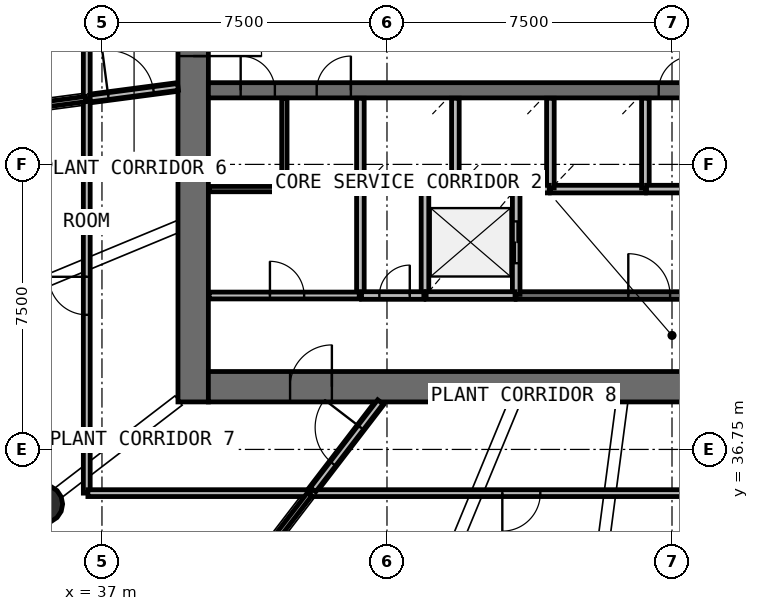
"""IFC4 building model, lengths in metres.
Left out: names, types, materials, properties, quantities, classifications, styles, units other than length and angle.
Written with IfcOpenShell. Run it as: python <this file> out.ifc"""

import sys

from ifc_helpers import new_model, si_unit, direction, frame, frame_2d, origin, origin_2d, place, context, subcontext, project, spatial, rectangle, circle, extrude, source, transform, mapped, element, fill, save


model = new_model("IFC4")
c1 = context("Model", 3, precision=1e-05, world=origin(), true_north=direction((0.0, 1.0)))
c2 = subcontext(c1, "Body", "Model", "MODEL_VIEW")
j1 = project(units=[si_unit("LENGTHUNIT", "METRE"), si_unit("PLANEANGLEUNIT", "RADIAN")], contexts=[c1])
p1 = place(None, origin())
s1 = spatial("IfcSite", under=j1, at=p1, CompositionType="ELEMENT")
p2 = place(p1, origin())
s2 = spatial("IfcBuilding", under=s1, at=p2, CompositionType="ELEMENT")
p3 = place(p2, frame((0.0, 0.0, 129.0)))
s3 = spatial("IfcBuildingStorey", under=s2, at=p3, CompositionType="ELEMENT", Elevation=129.0)
p4 = place(p3, frame((39.4, 58.0, 0.0), z_axis=(0.0, 0.0, 1.0), x_axis=(0.0, -1.0, 0.0)))
e1 = element("IfcWall", 1, at=p4, inside=s3, PredefinedType="SHEAR", context=c2, shape_type="SweptSolid", body=[
    extrude(rectangle(XDim=20.0, YDim=0.8, at=frame_2d((10.0, 0.0))), origin(), (0.0, 0.0, 1.0), 4.1),
])
p5 = place(p4, frame((9.1, 0.0, 0.0)))
e2 = element("IfcOpeningElement", 2, at=p5, cuts=e1, PredefinedType="OPENING", context=c2, shape_type="SweptSolid", body=[
    extrude(rectangle(XDim=1.8, YDim=2.1, at=frame_2d((0.9, 1.05))), frame((0.0, 0.41, 0.0), z_axis=(0.0, -1.0, 0.0), x_axis=(1.0, 0.0, 0.0)), (0.0, 0.0, 1.0), 0.82),
])
p6 = place(p3, frame((39.8, 38.4, 0.0), z_axis=(0.0, 0.0, 1.0), x_axis=(1.0, 0.0, 0.0)))
e3 = element("IfcWall", 3, at=p6, inside=s3, PredefinedType="SHEAR", context=c2, shape_type="SweptSolid", body=[
    extrude(rectangle(XDim=24.4, YDim=0.8, at=frame_2d((12.2, 0.0))), origin(), (0.0, 0.0, 1.0), 4.1),
])
p7 = place(p6, frame((21.65, 0.0, 0.0)))
e4 = element("IfcOpeningElement", 4, at=p7, cuts=e3, PredefinedType="OPENING", context=c2, shape_type="SweptSolid", body=[
    extrude(rectangle(XDim=1.1, YDim=2.1, at=frame_2d((0.55, 1.05))), frame((0.0, 0.41, 0.0), z_axis=(0.0, -1.0, 0.0), x_axis=(1.0, 0.0, 0.0)), (0.0, 0.0, 1.0), 0.82),
])
p8 = place(p6, frame((2.15, 0.0, 0.0)))
e5 = element("IfcOpeningElement", 5, at=p8, cuts=e3, PredefinedType="OPENING", context=c2, shape_type="SweptSolid", body=[
    extrude(rectangle(XDim=1.1, YDim=2.1, at=frame_2d((0.55, 1.05))), frame((0.0, 0.41, 0.0), z_axis=(0.0, -1.0, 0.0), x_axis=(1.0, 0.0, 0.0)), (0.0, 0.0, 1.0), 0.82),
])
p9 = place(p3, frame((39.8, 46.2, 0.0), z_axis=(0.0, 0.0, 1.0), x_axis=(1.0, 0.0, 0.0)))
e6 = element("IfcWall", 6, at=p9, inside=s3, PredefinedType="SHEAR", context=c2, shape_type="SweptSolid", body=[
    extrude(rectangle(XDim=24.4, YDim=0.4, at=frame_2d((12.2, 0.0))), origin(), (0.0, 0.0, 1.0), 4.1),
])
p10 = place(p9, frame((20.65, 0.0, 0.0)))
e7 = element("IfcOpeningElement", 7, at=p10, cuts=e6, PredefinedType="OPENING", context=c2, shape_type="SweptSolid", body=[
    extrude(rectangle(XDim=0.9, YDim=2.1, at=frame_2d((0.45, 1.05))), frame((0.0, 0.21, 0.0), z_axis=(0.0, -1.0, 0.0), x_axis=(1.0, 0.0, 0.0)), (0.0, 0.0, 1.0), 0.42),
])
p11 = place(p9, frame((22.65, 0.0, 0.0)))
e8 = element("IfcOpeningElement", 8, at=p11, cuts=e6, PredefinedType="OPENING", context=c2, shape_type="SweptSolid", body=[
    extrude(rectangle(XDim=0.9, YDim=2.1, at=frame_2d((0.45, 1.05))), frame((0.0, 0.21, 0.0), z_axis=(0.0, -1.0, 0.0), x_axis=(1.0, 0.0, 0.0)), (0.0, 0.0, 1.0), 0.42),
])
p12 = place(p9, frame((0.85, 0.0, 0.0)))
e9 = element("IfcOpeningElement", 9, at=p12, cuts=e6, PredefinedType="OPENING", context=c2, shape_type="SweptSolid", body=[
    extrude(rectangle(XDim=0.9, YDim=2.1, at=frame_2d((0.45, 1.05))), frame((0.0, 0.21, 0.0), z_axis=(0.0, -1.0, 0.0), x_axis=(1.0, 0.0, 0.0)), (0.0, 0.0, 1.0), 0.42),
])
p13 = place(p9, frame((2.85, 0.0, 0.0)))
e10 = element("IfcOpeningElement", 10, at=p13, cuts=e6, PredefinedType="OPENING", context=c2, shape_type="SweptSolid", body=[
    extrude(rectangle(XDim=0.9, YDim=2.1, at=frame_2d((0.45, 1.05))), frame((0.0, 0.21, 0.0), z_axis=(0.0, -1.0, 0.0), x_axis=(1.0, 0.0, 0.0)), (0.0, 0.0, 1.0), 0.42),
])
p14 = place(p9, frame((11.85, 0.0, 0.0)))
e11 = element("IfcOpeningElement", 11, at=p14, cuts=e6, PredefinedType="OPENING", context=c2, shape_type="SweptSolid", body=[
    extrude(rectangle(XDim=0.9, YDim=2.1, at=frame_2d((0.45, 1.05))), frame((0.0, 0.21, 0.0), z_axis=(0.0, -1.0, 0.0), x_axis=(1.0, 0.0, 0.0)), (0.0, 0.0, 1.0), 0.42),
])
m1 = source(origin(), c2, "Body", "SweptSolid", [
    extrude(circle(Radius=0.5, at=origin_2d()), origin(), (0.0, 0.0, 1.0), 3.78),
])
p15 = place(p3, frame((35.465, 35.312, 0.0), z_axis=(0.0, 0.0, 1.0), x_axis=(1.0, 0.0, 0.0)))
e12 = element("IfcColumn", 12, at=p15, inside=s3, PredefinedType="COLUMN", context=c2, shape_type="MappedRepresentation", body=[
    mapped(m1, transform((0.0, 0.0, 0.0), scale=1.0)),
])
p16 = place(p3, frame((47.9, 40.8, 0.0), z_axis=(0.0, 0.0, 1.0), x_axis=(1.0, 0.0, 0.0)))
e13 = element("IfcWall", 13, at=p16, inside=s3, PredefinedType="SOLIDWALL", context=c2, shape_type="SweptSolid", body=[
    extrude(rectangle(XDim=5.67, YDim=0.2, at=frame_2d((2.835, 0.0))), origin(), (0.0, 0.0, 1.0), 3.78),
])
p17 = place(p16, frame((2.95, 0.0, 0.0)))
e14 = element("IfcOpeningElement", 14, at=p17, cuts=e13, PredefinedType="OPENING", context=c2, shape_type="SweptSolid", body=[
    extrude(rectangle(XDim=1.1, YDim=2.1, at=frame_2d((0.55, 1.05))), frame((0.0, 0.11, 0.0), z_axis=(0.0, -1.0, 0.0), x_axis=(1.0, 0.0, 0.0)), (0.0, 0.0, 1.0), 0.22),
])
for number, where, z_axis, x_axis in (
    (15, (43.8, 43.6, 0.0), (0.0, 0.0, 1.0), (0.0, -1.0, 0.0)),
    (16, (45.5, 43.6, 0.0), (0.0, 0.0, 1.0), (0.0, -1.0, 0.0)),
):
    element("IfcWall", number, at=place(p3, frame(where, z_axis=z_axis, x_axis=x_axis)), inside=s3, PredefinedType="SOLIDWALL", context=c2, shape_type="SweptSolid", body=[
        extrude(rectangle(XDim=2.8, YDim=0.2, at=frame_2d((1.4, 0.0))), origin(), (0.0, 0.0, 1.0), 3.78),
    ])
p18 = place(p3, frame((47.9, 40.83, 0.0), z_axis=(0.0, 0.0, 1.0), x_axis=(0.0, 1.0, 0.0)))
e17 = element("IfcWall", 17, at=p18, inside=s3, PredefinedType="SOLIDWALL", context=c2, shape_type="SweptSolid", body=[
    extrude(rectangle(XDim=2.77, YDim=0.2, at=frame_2d((1.385, 0.0))), origin(), (0.0, 0.0, 1.0), 3.78),
])
p19 = place(p18, frame((0.82, 0.0, 0.0)))
e18 = element("IfcOpeningElement", 18, at=p19, cuts=e17, PredefinedType="OPENING", context=c2, shape_type="SweptSolid", body=[
    extrude(rectangle(XDim=1.1, YDim=2.1, at=frame_2d((0.55, 1.05))), frame((0.0, 0.11, 0.0), z_axis=(0.0, -1.0, 0.0), x_axis=(1.0, 0.0, 0.0)), (0.0, 0.0, 1.0), 0.22),
])
p20 = place(p3, frame((48.8, 43.6, 0.0), z_axis=(0.0, 0.0, 1.0), x_axis=(1.0, 0.0, 0.0)))
e19 = element("IfcWall", 19, at=p20, inside=s3, PredefinedType="SOLIDWALL", context=c2, shape_type="SweptSolid", body=[
    extrude(rectangle(XDim=2.5, YDim=0.2, at=frame_2d((1.25, 0.0))), origin(), (0.0, 0.0, 1.0), 3.78),
])
p21 = place(p3, frame((45.53, 40.8, 0.0), z_axis=(0.0, 0.0, 1.0), x_axis=(1.0, 0.0, 0.0)))
e20 = element("IfcWall", 20, at=p21, inside=s3, PredefinedType="SOLIDWALL", context=c2, shape_type="SweptSolid", body=[
    extrude(rectangle(XDim=2.34, YDim=0.2, at=frame_2d((1.17, 0.0))), origin(), (0.0, 0.0, 1.0), 3.78),
])
p22 = place(p3, frame((43.8, 45.99, 0.0), z_axis=(0.0, 0.0, 1.0), x_axis=(0.0, -1.0, 0.0)))
e21 = element("IfcWall", 21, at=p22, inside=s3, PredefinedType="SOLIDWALL", context=c2, shape_type="SweptSolid", body=[
    extrude(rectangle(XDim=2.36, YDim=0.2, at=frame_2d((1.18, 0.0))), origin(), (0.0, 0.0, 1.0), 3.78),
])
p23 = place(p3, frame((46.3, 43.6, 0.0), z_axis=(0.0, 0.0, 1.0), x_axis=(0.0, 1.0, 0.0)))
e22 = element("IfcWall", 22, at=p23, inside=s3, PredefinedType="SOLIDWALL", context=c2, shape_type="SweptSolid", body=[
    extrude(rectangle(XDim=2.39, YDim=0.2, at=frame_2d((1.195, 0.0))), origin(), (0.0, 0.0, 1.0), 3.78),
])
for number, where, z_axis, x_axis in (
    (23, (48.8, 43.63, 0.0), (0.0, 0.0, 1.0), (0.0, 1.0, 0.0)),
    (24, (51.3, 43.63, 0.0), (0.0, 0.0, 1.0), (0.0, 1.0, 0.0)),
):
    element("IfcWall", number, at=place(p3, frame(where, z_axis=z_axis, x_axis=x_axis)), inside=s3, PredefinedType="SOLIDWALL", context=c2, shape_type="SweptSolid", body=[
        extrude(rectangle(XDim=2.36, YDim=0.2, at=frame_2d((1.18, 0.0))), origin(), (0.0, 0.0, 1.0), 3.78),
    ])
p24 = place(p3, frame((43.83, 43.6, 0.0), z_axis=(0.0, 0.0, 1.0), x_axis=(1.0, 0.0, 0.0)))
e25 = element("IfcWall", 25, at=p24, inside=s3, PredefinedType="SOLIDWALL", context=c2, shape_type="SweptSolid", body=[
    extrude(rectangle(XDim=1.64, YDim=0.2, at=frame_2d((0.82, 0.0))), origin(), (0.0, 0.0, 1.0), 3.78),
])
p25 = place(p3, frame((43.83, 40.8, 0.0), z_axis=(0.0, 0.0, 1.0), x_axis=(1.0, 0.0, 0.0)))
e26 = element("IfcWall", 26, at=p25, inside=s3, PredefinedType="SOLIDWALL", context=c2, shape_type="SweptSolid", body=[
    extrude(rectangle(XDim=1.64, YDim=0.2, at=frame_2d((0.82, 0.0))), origin(), (0.0, 0.0, 1.0), 3.78),
])
p26 = place(p25, frame((0.47, 0.0, 0.0)))
e27 = element("IfcOpeningElement", 27, at=p26, cuts=e26, PredefinedType="OPENING", context=c2, shape_type="SweptSolid", body=[
    extrude(rectangle(XDim=0.8, YDim=2.1, at=frame_2d((0.4, 1.05))), frame((0.0, 0.11, 0.0), z_axis=(0.0, -1.0, 0.0), x_axis=(1.0, 0.0, 0.0)), (0.0, 0.0, 1.0), 0.22),
])
p27 = place(p3, frame((46.33, 43.6, 0.0), z_axis=(0.0, 0.0, 1.0), x_axis=(1.0, 0.0, 0.0)))
e28 = element("IfcWall", 28, at=p27, inside=s3, PredefinedType="SOLIDWALL", context=c2, shape_type="SweptSolid", body=[
    extrude(rectangle(XDim=1.54, YDim=0.2, at=frame_2d((0.77, 0.0))), origin(), (0.0, 0.0, 1.0), 3.78),
])
p28 = place(p3, frame((52.67, 43.6, 0.0), z_axis=(0.0, 0.0, 1.0), x_axis=(-1.0, 0.0, 0.0)))
e29 = element("IfcWall", 29, at=p28, inside=s3, PredefinedType="SOLIDWALL", context=c2, shape_type="SweptSolid", body=[
    extrude(rectangle(XDim=1.34, YDim=0.2, at=frame_2d((0.67, 0.0))), origin(), (0.0, 0.0, 1.0), 3.78),
])
p29 = place(p3, frame((47.93, 43.6, 0.0), z_axis=(0.0, 0.0, 1.0), x_axis=(1.0, 0.0, 0.0)))
e30 = element("IfcWall", 30, at=p29, inside=s3, PredefinedType="SOLIDWALL", context=c2, shape_type="SweptSolid", body=[
    extrude(rectangle(XDim=0.84, YDim=0.2, at=frame_2d((0.42, 0.0))), origin(), (0.0, 0.0, 1.0), 3.78),
])
p30 = place(p3, frame((45.53, 43.6, 0.0), z_axis=(0.0, 0.0, 1.0), x_axis=(1.0, 0.0, 0.0)))
e31 = element("IfcWall", 31, at=p30, inside=s3, PredefinedType="SOLIDWALL", context=c2, shape_type="SweptSolid", body=[
    extrude(rectangle(XDim=0.74, YDim=0.2, at=frame_2d((0.37, 0.0))), origin(), (0.0, 0.0, 1.0), 3.78),
])
p31 = place(p3, frame((36.6, 45.973, 0.0), z_axis=(0.0, 0.0, 1.0), x_axis=(0.0, 1.0, 0.0)))
e32 = element("IfcWall", 32, at=p31, inside=s3, PredefinedType="PARTITIONING", context=c2, shape_type="SweptSolid", body=[
    extrude(rectangle(XDim=13.24, YDim=0.18, at=frame_2d((6.62, 0.0))), origin(), (0.0, 0.0, 1.0), 2.58),
])
p32 = place(p31, frame((6.19, 0.0, 0.0)))
e33 = element("IfcOpeningElement", 33, at=p32, cuts=e32, PredefinedType="OPENING", context=c2, shape_type="SweptSolid", body=[
    extrude(rectangle(XDim=1.0, YDim=2.1, at=frame_2d((0.5, 1.05))), frame((0.0, 0.1, 0.0), z_axis=(0.0, -1.0, 0.0), x_axis=(1.0, 0.0, 0.0)), (0.0, 0.0, 1.0), 0.2),
])
p33 = place(p3, frame((53.603, 35.6, 0.0), z_axis=(0.0, 0.0, 1.0), x_axis=(-1.0, 0.0, 0.0)))
e34 = element("IfcWall", 34, at=p33, inside=s3, PredefinedType="PARTITIONING", context=c2, shape_type="SweptSolid", body=[
    extrude(rectangle(XDim=11.117, YDim=0.18, at=frame_2d((5.559, 0.0))), origin(), (0.0, 0.0, 1.0), 2.58),
])
p34 = place(p33, frame((5.067, 0.0, 0.0)))
e35 = element("IfcOpeningElement", 35, at=p34, cuts=e34, PredefinedType="OPENING", context=c2, shape_type="SweptSolid", body=[
    extrude(rectangle(XDim=1.0, YDim=2.1, at=frame_2d((0.5, 1.05))), frame((0.0, 0.1, 0.0), z_axis=(0.0, -1.0, 0.0), x_axis=(1.0, 0.0, 0.0)), (0.0, 0.0, 1.0), 0.2),
])
p35 = place(p3, frame((36.6, 35.6, 0.0), z_axis=(0.0, 0.0, 1.0), x_axis=(0.0, 1.0, 0.0)))
e36 = element("IfcWall", 36, at=p35, inside=s3, PredefinedType="PARTITIONING", context=c2, shape_type="SweptSolid", body=[
    extrude(rectangle(XDim=10.343, YDim=0.18, at=frame_2d((5.171, 0.0))), origin(), (0.0, 0.0, 1.0), 2.58),
])
p36 = place(p35, frame((4.693, 0.0, 0.0)))
e37 = element("IfcOpeningElement", 37, at=p36, cuts=e36, PredefinedType="OPENING", context=c2, shape_type="SweptSolid", body=[
    extrude(rectangle(XDim=1.0, YDim=2.1, at=frame_2d((0.5, 1.05))), frame((0.0, 0.1, 0.0), z_axis=(0.0, -1.0, 0.0), x_axis=(1.0, 0.0, 0.0)), (0.0, 0.0, 1.0), 0.2),
])
p37 = place(p3, frame((36.63, 35.6, 0.0), z_axis=(0.0, 0.0, 1.0), x_axis=(1.0, 0.0, 0.0)))
e38 = element("IfcWall", 38, at=p37, inside=s3, PredefinedType="PARTITIONING", context=c2, shape_type="SweptSolid", body=[
    extrude(rectangle(XDim=5.825, YDim=0.18, at=frame_2d((2.913, 0.0))), origin(), (0.0, 0.0, 1.0), 2.58),
])
p38 = place(p3, frame((39.82, 40.8, 0.0), z_axis=(0.0, 0.0, 1.0), x_axis=(1.0, 0.0, 0.0)))
e39 = element("IfcWall", 39, at=p38, inside=s3, PredefinedType="PARTITIONING", context=c2, shape_type="SweptSolid", body=[
    extrude(rectangle(XDim=3.95, YDim=0.18, at=frame_2d((1.975, 0.0))), origin(), (0.0, 0.0, 1.0), 3.78),
])
p39 = place(p38, frame((1.6, 0.0, 0.0)))
e40 = element("IfcOpeningElement", 40, at=p39, cuts=e39, PredefinedType="OPENING", context=c2, shape_type="SweptSolid", body=[
    extrude(rectangle(XDim=0.9, YDim=2.1, at=frame_2d((0.45, 1.05))), frame((0.0, 0.1, 0.0), z_axis=(0.0, -1.0, 0.0), x_axis=(1.0, 0.0, 0.0)), (0.0, 0.0, 1.0), 0.2),
])
p40 = place(p3, frame((42.554, 35.69, 0.0), z_axis=(0.0, 0.0, 1.0), x_axis=(0.608737787706, 0.793371480341, 0.0)))
e41 = element("IfcWall", 41, at=p40, inside=s3, PredefinedType="PARTITIONING", context=c2, shape_type="SweptSolid", body=[
    extrude(rectangle(XDim=2.912, YDim=0.18, at=frame_2d((1.456, 0.0))), origin(), (0.0, 0.0, 1.0), 2.58),
])
p41 = place(p40, frame((0.862, 0.0, 0.0)))
e42 = element("IfcOpeningElement", 42, at=p41, cuts=e41, PredefinedType="OPENING", context=c2, shape_type="SweptSolid", body=[
    extrude(rectangle(XDim=1.2, YDim=2.1, at=frame_2d((0.6, 1.05))), frame((0.0, 0.1, 0.0), z_axis=(0.0, -1.0, 0.0), x_axis=(1.0, 0.0, 0.0)), (0.0, 0.0, 1.0), 0.2),
])
p42 = place(p3, frame((36.69, 45.984, 0.0), z_axis=(0.0, 0.0, 1.0), x_axis=(0.991440737811, 0.130557509967, 0.0)))
e43 = element("IfcWall", 43, at=p42, inside=s3, PredefinedType="PARTITIONING", context=c2, shape_type="SweptSolid", body=[
    extrude(rectangle(XDim=2.33, YDim=0.18, at=frame_2d((1.165, 0.0))), origin(), (0.0, 0.0, 1.0), 2.58),
])
p43 = place(p42, frame((0.48, 0.0, 0.0)))
e44 = element("IfcOpeningElement", 44, at=p43, cuts=e43, PredefinedType="OPENING", context=c2, shape_type="SweptSolid", body=[
    extrude(rectangle(XDim=1.2, YDim=2.1, at=frame_2d((0.6, 1.05))), frame((0.0, 0.1, 0.0), z_axis=(0.0, -1.0, 0.0), x_axis=(1.0, 0.0, 0.0)), (0.0, 0.0, 1.0), 0.2),
])
p44 = place(p3, frame((36.57, 45.969, 0.0), z_axis=(0.0, 0.0, 1.0), x_axis=(-0.991447734454, -0.130504367157, 0.0)))
e45 = element("IfcWall", 45, at=p44, inside=s3, PredefinedType="PARTITIONING", context=c2, shape_type="SweptSolid", body=[
    extrude(rectangle(XDim=3.547, YDim=0.14, at=frame_2d((1.773, 0.0))), origin(), (0.0, 0.0, 1.0), 2.58),
])
p45 = place(p3, frame((41.8, 43.6, 0.0), z_axis=(0.0, 0.0, 1.0), x_axis=(0.0, 1.0, 0.0)))
e46 = element("IfcWall", 46, at=p45, inside=s3, PredefinedType="PARTITIONING", context=c2, shape_type="SweptSolid", body=[
    extrude(rectangle(XDim=2.39, YDim=0.14, at=frame_2d((1.195, 0.0))), origin(), (0.0, 0.0, 1.0), 2.98),
])
p46 = place(p3, frame((42.463, 35.571, 0.0), z_axis=(0.0, 0.0, 1.0), x_axis=(-0.608788650818, -0.79333245152, 0.0)))
e47 = element("IfcWall", 47, at=p46, inside=s3, PredefinedType="PARTITIONING", context=c2, shape_type="SweptSolid", body=[
    extrude(rectangle(XDim=2.253, YDim=0.14, at=frame_2d((1.126, 0.0))), origin(), (0.0, 0.0, 1.0), 2.58),
])
p47 = place(p3, frame((43.77, 43.6, 0.0), z_axis=(0.0, 0.0, 1.0), x_axis=(-1.0, 0.0, 0.0)))
e48 = element("IfcWall", 48, at=p47, inside=s3, PredefinedType="PARTITIONING", context=c2, shape_type="SweptSolid", body=[
    extrude(rectangle(XDim=1.94, YDim=0.14, at=frame_2d((0.97, 0.0))), origin(), (0.0, 0.0, 1.0), 2.98),
])
p48 = place(p3, frame((41.77, 43.6, 0.0), z_axis=(0.0, 0.0, 1.0), x_axis=(-1.0, 0.0, 0.0)))
e49 = element("IfcWall", 49, at=p48, inside=s3, PredefinedType="PARTITIONING", context=c2, shape_type="SweptSolid", body=[
    extrude(rectangle(XDim=1.95, YDim=0.14, at=frame_2d((0.975, 0.0))), origin(), (0.0, 0.0, 1.0), 2.98),
])
m2 = source(origin(), c2, "Body", "SweptSolid", [
    extrude(rectangle(XDim=1.8, YDim=2.1, at=frame_2d((0.9, 1.05))), frame((0.0, 0.025, 0.0), z_axis=(0.0, -1.0, 0.0), x_axis=(1.0, 0.0, 0.0)), (0.0, 0.0, 1.0), 0.05),
])
p49 = place(p5, origin())
e50 = element("IfcDoor", 50, at=p49, inside=s3, OperationType="SINGLE_SWING_RIGHT", PredefinedType="DOOR", context=c2, shape_type="MappedRepresentation", body=[
    mapped(m2, transform((0.0, 0.0, 0.0), scale=1.0)),
])
fill(e2, e50)
m3 = source(origin(), c2, "Body", "SweptSolid", [
    extrude(rectangle(XDim=1.1, YDim=2.1, at=frame_2d((0.55, 1.05))), frame((0.0, 0.025, 0.0), z_axis=(0.0, -1.0, 0.0), x_axis=(1.0, 0.0, 0.0)), (0.0, 0.0, 1.0), 0.05),
])
p50 = place(p19, origin())
e51 = element("IfcDoor", 51, at=p50, inside=s3, OperationType="DOUBLE_DOOR_SLIDING", PredefinedType="USERDEFINED", context=c2, shape_type="MappedRepresentation", body=[
    mapped(m3, transform((0.0, 0.0, 0.0), scale=1.0)),
])
fill(e18, e51)
m4 = source(origin(), c2, "Body", "SweptSolid", [
    extrude(rectangle(XDim=1.1, YDim=2.1, at=frame_2d((0.55, 1.05))), frame((0.0, 0.025, 0.0), z_axis=(0.0, -1.0, 0.0), x_axis=(1.0, 0.0, 0.0)), (0.0, 0.0, 1.0), 0.05),
])
p51 = place(p17, origin())
e52 = element("IfcDoor", 52, at=p51, inside=s3, OperationType="SINGLE_SWING_LEFT", PredefinedType="DOOR", context=c2, shape_type="MappedRepresentation", body=[
    mapped(m4, transform((0.0, 0.0, 0.0), scale=1.0)),
])
fill(e14, e52)
m5 = source(origin(), c2, "Body", "SweptSolid", [
    extrude(rectangle(XDim=0.8, YDim=2.1, at=frame_2d((0.4, 1.05))), frame((0.0, 0.025, 0.0), z_axis=(0.0, -1.0, 0.0), x_axis=(1.0, 0.0, 0.0)), (0.0, 0.0, 1.0), 0.05),
])
p52 = place(p26, origin())
e53 = element("IfcDoor", 53, at=p52, inside=s3, OperationType="SINGLE_SWING_RIGHT", PredefinedType="DOOR", context=c2, shape_type="MappedRepresentation", body=[
    mapped(m5, transform((0.0, 0.0, 0.0), scale=1.0)),
])
fill(e27, e53)
m6 = source(origin(), c2, "Body", "SweptSolid", [
    extrude(rectangle(XDim=1.1, YDim=2.1, at=frame_2d((0.55, 1.05))), frame((0.0, 0.025, 0.0), z_axis=(0.0, -1.0, 0.0), x_axis=(1.0, 0.0, 0.0)), (0.0, 0.0, 1.0), 0.05),
])
p53 = place(p8, origin())
e54 = element("IfcDoor", 54, at=p53, inside=s3, OperationType="SINGLE_SWING_RIGHT", PredefinedType="DOOR", context=c2, shape_type="MappedRepresentation", body=[
    mapped(m6, transform((0.0, 0.0, 0.0), scale=1.0)),
])
fill(e5, e54)
m7 = source(origin(), c2, "Body", "SweptSolid", [
    extrude(rectangle(XDim=1.0, YDim=2.1, at=frame_2d((0.5, 1.05))), frame((0.0, 0.025, 0.0), z_axis=(0.0, -1.0, 0.0), x_axis=(1.0, 0.0, 0.0)), (0.0, 0.0, 1.0), 0.05),
])
p54 = place(p36, origin())
e55 = element("IfcDoor", 55, at=p54, inside=s3, OperationType="SINGLE_SWING_RIGHT", PredefinedType="DOOR", context=c2, shape_type="MappedRepresentation", body=[
    mapped(m7, transform((0.0, 0.0, 0.0), scale=1.0)),
])
fill(e37, e55)
p55 = place(p34, origin())
e56 = element("IfcDoor", 56, at=p55, inside=s3, OperationType="SINGLE_SWING_RIGHT", PredefinedType="DOOR", context=c2, shape_type="MappedRepresentation", body=[
    mapped(m7, transform((0.0, 0.0, 0.0), scale=1.0)),
])
fill(e35, e56)
m8 = source(origin(), c2, "Body", "SweptSolid", [
    extrude(rectangle(XDim=1.2, YDim=2.1, at=frame_2d((0.6, 1.05))), frame((0.0, 0.025, 0.0), z_axis=(0.0, -1.0, 0.0), x_axis=(1.0, 0.0, 0.0)), (0.0, 0.0, 1.0), 0.05),
])
p56 = place(p43, origin())
e57 = element("IfcDoor", 57, at=p56, inside=s3, OperationType="SINGLE_SWING_LEFT", PredefinedType="DOOR", context=c2, shape_type="MappedRepresentation", body=[
    mapped(m8, transform((0.0, 0.0, 0.0), scale=1.0)),
])
fill(e44, e57)
p57 = place(p41, origin())
e58 = element("IfcDoor", 58, at=p57, inside=s3, OperationType="SINGLE_SWING_RIGHT", PredefinedType="DOOR", context=c2, shape_type="MappedRepresentation", body=[
    mapped(m8, transform((0.0, 0.0, 0.0), scale=1.0)),
])
fill(e42, e58)
m9 = source(origin(), c2, "Body", "SweptSolid", [
    extrude(rectangle(XDim=0.9, YDim=2.1, at=frame_2d((0.45, 1.05))), frame((0.0, 0.025, 0.0), z_axis=(0.0, -1.0, 0.0), x_axis=(1.0, 0.0, 0.0)), (0.0, 0.0, 1.0), 0.05),
])
p58 = place(p39, origin())
e59 = element("IfcDoor", 59, at=p58, inside=s3, OperationType="SINGLE_SWING_LEFT", PredefinedType="DOOR", context=c2, shape_type="MappedRepresentation", body=[
    mapped(m9, transform((0.0, 0.0, 0.0), scale=1.0)),
])
fill(e40, e59)
p59 = place(p12, origin())
e60 = element("IfcDoor", 60, at=p59, inside=s3, OperationType="SINGLE_SWING_LEFT", PredefinedType="DOOR", context=c2, shape_type="MappedRepresentation", body=[
    mapped(m9, transform((0.0, 0.0, 0.0), scale=1.0)),
])
fill(e9, e60)
p60 = place(p13, origin())
e61 = element("IfcDoor", 61, at=p60, inside=s3, OperationType="SINGLE_SWING_RIGHT", PredefinedType="DOOR", context=c2, shape_type="MappedRepresentation", body=[
    mapped(m9, transform((0.0, 0.0, 0.0), scale=1.0)),
])
fill(e10, e61)
p61 = place(p14, origin())
e62 = element("IfcDoor", 62, at=p61, inside=s3, OperationType="SINGLE_SWING_RIGHT", PredefinedType="DOOR", context=c2, shape_type="MappedRepresentation", body=[
    mapped(m9, transform((0.0, 0.0, 0.0), scale=1.0)),
])
fill(e11, e62)
save(model, sys.argv[1])
